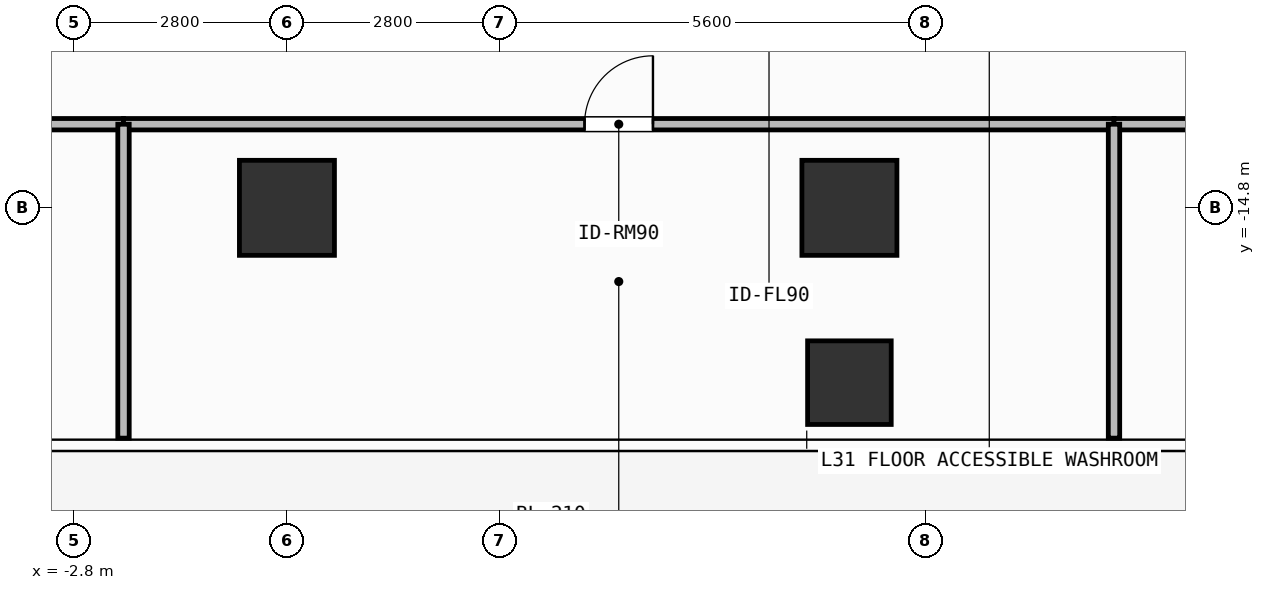
"""IFC4 building model, lengths in metres.
Left out: names, types, materials, properties, quantities, classifications, styles, units other than length and angle.
Written with IfcOpenShell. Run it as: python <this file> out.ifc"""

import sys

from ifc_helpers import new_model, si_unit, direction, frame, frame_2d, origin, origin_2d, place, context, subcontext, project, spatial, rectangle, extrude, element, fill, save


model = new_model("IFC4")
c1 = context("Model", 3, precision=1e-05, world=origin(), true_north=direction((0.0, 1.0)))
c2 = subcontext(c1, "Body", "Model", "MODEL_VIEW")
j1 = project(units=[si_unit("LENGTHUNIT", "METRE"), si_unit("PLANEANGLEUNIT", "RADIAN")], contexts=[c1])
p1 = place(None, origin())
s1 = spatial("IfcSite", under=j1, at=p1, CompositionType="ELEMENT")
p2 = place(p1, origin())
s2 = spatial("IfcBuilding", under=s1, at=p2, CompositionType="ELEMENT")
p3 = place(p2, frame((0.0, 0.0, 125.1)))
s3 = spatial("IfcBuildingStorey", under=s2, at=p3, CompositionType="ELEMENT", Elevation=125.1)
for number, where, z_axis, x_axis in (
    (1, (0.0, -14.8, 0.0), (0.0, 0.0, 1.0), (1.0, 0.0, 0.0)),
    (2, (7.4, -14.8, 0.0), (0.0, 0.0, 1.0), (1.0, 0.0, 0.0)),
):
    element("IfcColumn", number, at=place(p3, frame(where, z_axis=z_axis, x_axis=x_axis)), inside=s3, PredefinedType="COLUMN", context=c2, shape_type="SweptSolid", body=[
        extrude(rectangle(XDim=1.25, YDim=1.25, at=origin_2d()), origin(), (0.0, 0.0, 1.0), 3.9),
    ])
p4 = place(p3, frame((7.4, -17.1, 0.0), z_axis=(0.0, 0.0, 1.0), x_axis=(1.0, 0.0, 0.0)))
e3 = element("IfcColumn", 3, at=p4, inside=s3, PredefinedType="COLUMN", context=c2, shape_type="SweptSolid", body=[
    extrude(rectangle(XDim=1.1, YDim=1.1, at=origin_2d()), origin(), (0.0, 0.0, 1.0), 3.9),
])
p5 = place(p3, frame((-19.33, -13.7, 0.0), z_axis=(0.0, 0.0, 1.0), x_axis=(1.0, 0.0, 0.0)))
e4 = element("IfcWall", 4, at=p5, inside=s3, PredefinedType="PARTITIONING", context=c2, shape_type="SweptSolid", body=[
    extrude(rectangle(XDim=17.18, YDim=0.15, at=frame_2d((8.59, 0.0))), origin(), (0.0, 0.0, 1.0), 3.68),
])
p6 = place(p5, frame((8.05, 0.0, 0.0)))
e5 = element("IfcOpeningElement", 5, at=p6, cuts=e4, PredefinedType="OPENING", context=c2, shape_type="SweptSolid", body=[
    extrude(rectangle(XDim=0.9, YDim=2.1, at=frame_2d((0.45, 1.05))), frame((0.0, 0.085, 0.0), z_axis=(0.0, -1.0, 0.0), x_axis=(1.0, 0.0, 0.0)), (0.0, 0.0, 1.0), 0.17),
])
p7 = place(p3, frame((-2.15, -13.7, 0.0), z_axis=(0.0, 0.0, 1.0), x_axis=(1.0, 0.0, 0.0)))
e6 = element("IfcWall", 6, at=p7, inside=s3, PredefinedType="PARTITIONING", context=c2, shape_type="SweptSolid", body=[
    extrude(rectangle(XDim=13.031, YDim=0.15, at=frame_2d((6.516, 0.0))), origin(), (0.0, 0.0, 1.0), 3.68),
])
p8 = place(p7, frame((6.065, 0.0, 0.0)))
e7 = element("IfcOpeningElement", 7, at=p8, cuts=e6, PredefinedType="OPENING", context=c2, shape_type="SweptSolid", body=[
    extrude(rectangle(XDim=0.9, YDim=2.1, at=frame_2d((0.45, 1.05))), frame((0.0, 0.085, 0.0), z_axis=(0.0, -1.0, 0.0), x_axis=(1.0, 0.0, 0.0)), (0.0, 0.0, 1.0), 0.17),
])
p9 = place(p3, frame((10.881, -13.7, 0.0), z_axis=(0.0, 0.0, 1.0), x_axis=(1.0, 0.0, 0.0)))
e8 = element("IfcWall", 8, at=p9, inside=s3, PredefinedType="PARTITIONING", context=c2, shape_type="SweptSolid", body=[
    extrude(rectangle(XDim=16.249, YDim=0.15, at=frame_2d((8.125, 0.0))), origin(), (0.0, 0.0, 1.0), 3.68),
])
p10 = place(p9, frame((6.959, 0.0, 0.0)))
e9 = element("IfcOpeningElement", 9, at=p10, cuts=e8, PredefinedType="OPENING", context=c2, shape_type="SweptSolid", body=[
    extrude(rectangle(XDim=0.9, YDim=2.1, at=frame_2d((0.45, 1.05))), frame((0.0, 0.085, 0.0), z_axis=(0.0, -1.0, 0.0), x_axis=(1.0, 0.0, 0.0)), (0.0, 0.0, 1.0), 0.17),
])
for number, where, z_axis, x_axis in (
    (10, (-2.15, -17.83, 0.0), (0.0, 0.0, 1.0), (0.0, 1.0, 0.0)),
    (11, (10.881, -17.83, 0.0), (0.0, 0.0, 1.0), (0.0, 1.0, 0.0)),
):
    element("IfcWall", number, at=place(p3, frame(where, z_axis=z_axis, x_axis=x_axis)), inside=s3, PredefinedType="PARTITIONING", context=c2, shape_type="SweptSolid", body=[
        extrude(rectangle(XDim=4.13, YDim=0.15, at=frame_2d((2.065, 0.0))), origin(), (0.0, 0.0, 1.0), 3.68),
    ])
p11 = place(p8, origin())
e12 = element("IfcDoor", 12, at=p11, inside=s3, OperationType="SINGLE_SWING_RIGHT", PredefinedType="DOOR", context=c2, shape_type="SweptSolid", body=[
    extrude(rectangle(XDim=0.9, YDim=2.1, at=frame_2d((0.45, 1.05))), frame((0.0, 0.025, 0.0), z_axis=(0.0, -1.0, 0.0), x_axis=(1.0, 0.0, 0.0)), (0.0, 0.0, 1.0), 0.05),
])
fill(e7, e12)
save(model, sys.argv[1])
